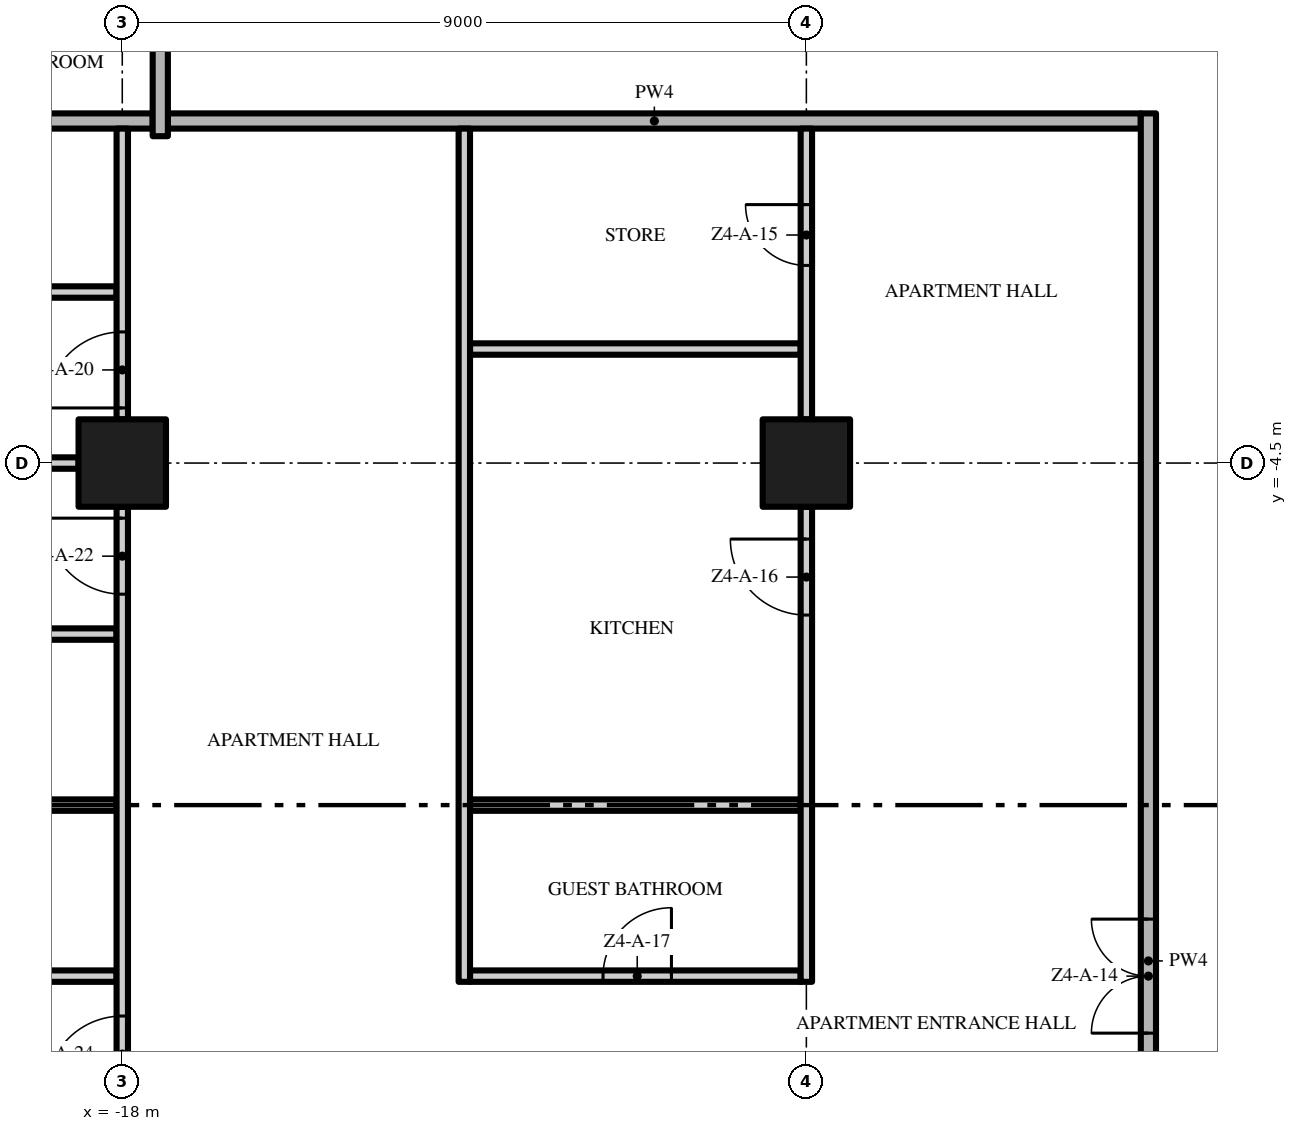
"""IFC4 building model, lengths in metres.
Left out: names, types, materials, properties, quantities, classifications, styles, units other than length and angle.
Written with IfcOpenShell. Run it as: python <this file> out.ifc"""

import sys

from ifc_helpers import new_model, si_unit, direction, frame, frame_2d, origin, origin_2d, place, context, subcontext, project, spatial, rectangle, extrude, element, fill, save


model = new_model("IFC4")
c1 = context("Model", 3, precision=1e-05, world=origin(), true_north=direction((0.0, 1.0)))
c2 = subcontext(c1, "Body", "Model", "MODEL_VIEW")
j1 = project(units=[si_unit("LENGTHUNIT", "METRE"), si_unit("PLANEANGLEUNIT", "RADIAN")], contexts=[c1])
p1 = place(None, origin())
s1 = spatial("IfcSite", under=j1, at=p1, CompositionType="ELEMENT")
p2 = place(p1, origin())
s2 = spatial("IfcBuilding", under=s1, at=p2, CompositionType="ELEMENT")
p3 = place(p2, frame((0.0, 0.0, 192.0)))
s3 = spatial("IfcBuildingStorey", under=s2, at=p3, CompositionType="ELEMENT", Elevation=192.0)
for number, where, z_axis, x_axis in (
    (1, (-18.0, -4.5, 0.0), (0.0, 0.0, 1.0), (1.0, 0.0, 0.0)),
    (2, (-9.0, -4.5, 0.0), (0.0, 0.0, 1.0), (1.0, 0.0, 0.0)),
):
    element("IfcColumn", number, at=place(p3, frame(where, z_axis=z_axis, x_axis=x_axis)), inside=s3, PredefinedType="COLUMN", context=c2, shape_type="SweptSolid", body=[
        extrude(rectangle(XDim=1.15, YDim=1.15, at=origin_2d()), origin(), (0.0, 0.0, 1.0), 3.5),
    ])
p4 = place(p3, frame((-20.925, -11.25, 0.0), z_axis=(0.0, 0.0, 1.0), x_axis=(1.0, 0.0, 0.0)))
e3 = element("IfcWall", 3, at=p4, inside=s3, PredefinedType="PARTITIONING", context=c2, shape_type="SweptSolid", body=[
    extrude(rectangle(XDim=2.85, YDim=0.15, at=frame_2d((1.425, 0.0))), origin(), (0.0, 0.0, 1.0), 3.5),
])
p5 = place(p3, frame((-13.425, -11.25, 0.0), z_axis=(0.0, 0.0, 1.0), x_axis=(1.0, 0.0, 0.0)))
e4 = element("IfcWall", 4, at=p5, inside=s3, PredefinedType="PARTITIONING", context=c2, shape_type="SweptSolid", body=[
    extrude(rectangle(XDim=4.35, YDim=0.15, at=frame_2d((2.175, 0.0))), origin(), (0.0, 0.0, 1.0), 3.5),
])
p6 = place(p5, frame((1.75, 0.0, 0.0)))
e5 = element("IfcOpeningElement", 5, at=p6, cuts=e4, PredefinedType="OPENING", context=c2, shape_type="SweptSolid", body=[
    extrude(rectangle(XDim=0.9, YDim=2.1, at=frame_2d((0.45, 1.05))), frame((0.0, 0.085, 0.0), z_axis=(0.0, -1.0, 0.0), x_axis=(1.0, 0.0, 0.0)), (0.0, 0.0, 1.0), 0.17),
])
p7 = place(p3, frame((-20.925, -9.0, 0.0), z_axis=(0.0, 0.0, 1.0), x_axis=(1.0, 0.0, 0.0)))
e6 = element("IfcWall", 6, at=p7, inside=s3, PredefinedType="PARTITIONING", context=c2, shape_type="SweptSolid", body=[
    extrude(rectangle(XDim=2.85, YDim=0.15, at=frame_2d((1.425, 0.0))), origin(), (0.0, 0.0, 1.0), 3.5),
])
p8 = place(p3, frame((-13.425, -9.0, 0.0), z_axis=(0.0, 0.0, 1.0), x_axis=(1.0, 0.0, 0.0)))
e7 = element("IfcWall", 7, at=p8, inside=s3, PredefinedType="PARTITIONING", context=c2, shape_type="SweptSolid", body=[
    extrude(rectangle(XDim=4.35, YDim=0.15, at=frame_2d((2.175, 0.0))), origin(), (0.0, 0.0, 1.0), 3.5),
])
p9 = place(p3, frame((-20.925, -6.75, 0.0), z_axis=(0.0, 0.0, 1.0), x_axis=(1.0, 0.0, 0.0)))
e8 = element("IfcWall", 8, at=p9, inside=s3, PredefinedType="PARTITIONING", context=c2, shape_type="SweptSolid", body=[
    extrude(rectangle(XDim=2.85, YDim=0.15, at=frame_2d((1.425, 0.0))), origin(), (0.0, 0.0, 1.0), 3.5),
])
p10 = place(p3, frame((-25.95, -4.5, 0.0), z_axis=(0.0, 0.0, 1.0), x_axis=(1.0, 0.0, 0.0)))
e9 = element("IfcWall", 9, at=p10, inside=s3, PredefinedType="PARTITIONING", context=c2, shape_type="SweptSolid", body=[
    extrude(rectangle(XDim=7.375, YDim=0.15, at=frame_2d((3.688, 0.0))), origin(), (0.0, 0.0, 1.0), 3.5),
])
p11 = place(p3, frame((-13.425, -3.0, 0.0), z_axis=(0.0, 0.0, 1.0), x_axis=(1.0, 0.0, 0.0)))
e10 = element("IfcWall", 10, at=p11, inside=s3, PredefinedType="PARTITIONING", context=c2, shape_type="SweptSolid", body=[
    extrude(rectangle(XDim=4.35, YDim=0.15, at=frame_2d((2.175, 0.0))), origin(), (0.0, 0.0, 1.0), 3.5),
])
p12 = place(p3, frame((-20.925, -2.25, 0.0), z_axis=(0.0, 0.0, 1.0), x_axis=(1.0, 0.0, 0.0)))
e11 = element("IfcWall", 11, at=p12, inside=s3, PredefinedType="PARTITIONING", context=c2, shape_type="SweptSolid", body=[
    extrude(rectangle(XDim=2.85, YDim=0.15, at=frame_2d((1.425, 0.0))), origin(), (0.0, 0.0, 1.0), 3.5),
])
p13 = place(p3, frame((-17.4, 0.0, 0.0), z_axis=(0.0, 0.0, 1.0), x_axis=(1.0, 0.0, 0.0)))
e12 = element("IfcWall", 12, at=p13, inside=s3, PredefinedType="PARTITIONING", context=c2, shape_type="SweptSolid", body=[
    extrude(rectangle(XDim=12.8, YDim=0.2, at=frame_2d((6.4, 0.0))), origin(), (0.0, 0.0, 1.0), 3.5),
])
p14 = place(p3, frame((-26.7, 0.0, 0.0), z_axis=(0.0, 0.0, 1.0), x_axis=(1.0, 0.0, 0.0)))
e13 = element("IfcWall", 13, at=p14, inside=s3, PredefinedType="PARTITIONING", context=c2, shape_type="SweptSolid", body=[
    extrude(rectangle(XDim=9.1, YDim=0.2, at=frame_2d((4.55, 0.0))), origin(), (0.0, 0.0, 1.0), 3.5),
])
p15 = place(p3, frame((-18.0, -12.925, 0.0), z_axis=(0.0, 0.0, 1.0), x_axis=(0.0, 1.0, 0.0)))
e14 = element("IfcWall", 14, at=p15, inside=s3, PredefinedType="PARTITIONING", context=c2, shape_type="SweptSolid", body=[
    extrude(rectangle(XDim=7.85, YDim=0.15, at=frame_2d((3.925, 0.0))), origin(), (0.0, 0.0, 1.0), 3.5),
])
p16 = place(p15, frame((6.7, 0.0, 0.0)))
e15 = element("IfcOpeningElement", 15, at=p16, cuts=e14, PredefinedType="OPENING", context=c2, shape_type="SweptSolid", body=[
    extrude(rectangle(XDim=1.0, YDim=2.4, at=frame_2d((0.5, 1.2))), frame((0.0, 0.085, 0.0), z_axis=(0.0, -1.0, 0.0), x_axis=(1.0, 0.0, 0.0)), (0.0, 0.0, 1.0), 0.17),
])
p17 = place(p15, frame((0.15, 0.0, 0.0)))
e16 = element("IfcOpeningElement", 16, at=p17, cuts=e14, PredefinedType="OPENING", context=c2, shape_type="SweptSolid", body=[
    extrude(rectangle(XDim=1.0, YDim=2.4, at=frame_2d((0.5, 1.2))), frame((0.0, 0.085, 0.0), z_axis=(0.0, -1.0, 0.0), x_axis=(1.0, 0.0, 0.0)), (0.0, 0.0, 1.0), 0.17),
])
p18 = place(p3, frame((-18.0, -3.925, 0.0), z_axis=(0.0, 0.0, 1.0), x_axis=(0.0, 1.0, 0.0)))
e17 = element("IfcWall", 17, at=p18, inside=s3, PredefinedType="PARTITIONING", context=c2, shape_type="SweptSolid", body=[
    extrude(rectangle(XDim=3.825, YDim=0.15, at=frame_2d((1.913, 0.0))), origin(), (0.0, 0.0, 1.0), 3.5),
])
p19 = place(p18, frame((0.15, 0.0, 0.0)))
e18 = element("IfcOpeningElement", 18, at=p19, cuts=e17, PredefinedType="OPENING", context=c2, shape_type="SweptSolid", body=[
    extrude(rectangle(XDim=1.0, YDim=2.4, at=frame_2d((0.5, 1.2))), frame((0.0, 0.085, 0.0), z_axis=(0.0, -1.0, 0.0), x_axis=(1.0, 0.0, 0.0)), (0.0, 0.0, 1.0), 0.17),
])
p20 = place(p3, frame((-17.5, -0.2, 0.0), z_axis=(0.0, 0.0, 1.0), x_axis=(0.0, 1.0, 0.0)))
e19 = element("IfcWall", 19, at=p20, inside=s3, PredefinedType="PARTITIONING", context=c2, shape_type="SweptSolid", body=[
    extrude(rectangle(XDim=4.125, YDim=0.2, at=frame_2d((2.062, 0.0))), origin(), (0.0, 0.0, 1.0), 3.5),
])
p21 = place(p3, frame((-13.5, -11.325, 0.0), z_axis=(0.0, 0.0, 1.0), x_axis=(0.0, 1.0, 0.0)))
e20 = element("IfcWall", 20, at=p21, inside=s3, PredefinedType="PARTITIONING", context=c2, shape_type="SweptSolid", body=[
    extrude(rectangle(XDim=11.225, YDim=0.15, at=frame_2d((5.612, 0.0))), origin(), (0.0, 0.0, 1.0), 3.5),
])
p22 = place(p3, frame((-9.0, -11.325, 0.0), z_axis=(0.0, 0.0, 1.0), x_axis=(0.0, 1.0, 0.0)))
e21 = element("IfcWall", 21, at=p22, inside=s3, PredefinedType="PARTITIONING", context=c2, shape_type="SweptSolid", body=[
    extrude(rectangle(XDim=6.25, YDim=0.15, at=frame_2d((3.125, 0.0))), origin(), (0.0, 0.0, 1.0), 3.5),
])
p23 = place(p22, frame((4.825, 0.0, 0.0)))
e22 = element("IfcOpeningElement", 22, at=p23, cuts=e21, PredefinedType="OPENING", context=c2, shape_type="SweptSolid", body=[
    extrude(rectangle(XDim=1.0, YDim=2.4, at=frame_2d((0.5, 1.2))), frame((0.0, 0.085, 0.0), z_axis=(0.0, -1.0, 0.0), x_axis=(1.0, 0.0, 0.0)), (0.0, 0.0, 1.0), 0.17),
])
p24 = place(p3, frame((-9.0, -3.925, 0.0), z_axis=(0.0, 0.0, 1.0), x_axis=(0.0, 1.0, 0.0)))
e23 = element("IfcWall", 23, at=p24, inside=s3, PredefinedType="PARTITIONING", context=c2, shape_type="SweptSolid", body=[
    extrude(rectangle(XDim=3.825, YDim=0.15, at=frame_2d((1.913, 0.0))), origin(), (0.0, 0.0, 1.0), 3.5),
])
p25 = place(p24, frame((2.025, 0.0, 0.0)))
e24 = element("IfcOpeningElement", 24, at=p25, cuts=e23, PredefinedType="OPENING", context=c2, shape_type="SweptSolid", body=[
    extrude(rectangle(XDim=0.8, YDim=2.0, at=frame_2d((0.4, 1.0))), frame((0.0, 0.085, 0.0), z_axis=(0.0, -1.0, 0.0), x_axis=(1.0, 0.0, 0.0)), (0.0, 0.0, 1.0), 0.17),
])
p26 = place(p3, frame((-4.5, -22.2, 0.0), z_axis=(0.0, 0.0, 1.0), x_axis=(0.0, 1.0, 0.0)))
e25 = element("IfcWall", 25, at=p26, inside=s3, PredefinedType="PARTITIONING", context=c2, shape_type="SweptSolid", body=[
    extrude(rectangle(XDim=22.3, YDim=0.2, at=frame_2d((11.15, 0.0))), origin(), (0.0, 0.0, 1.0), 3.5),
])
p27 = place(p26, frame((10.2, 0.0, 0.0)))
e26 = element("IfcOpeningElement", 26, at=p27, cuts=e25, PredefinedType="OPENING", context=c2, shape_type="SweptSolid", body=[
    extrude(rectangle(XDim=1.5, YDim=2.4, at=frame_2d((0.75, 1.2))), frame((0.0, 0.11, 0.0), z_axis=(0.0, -1.0, 0.0), x_axis=(1.0, 0.0, 0.0)), (0.0, 0.0, 1.0), 0.22),
])
p28 = place(p27, origin())
e27 = element("IfcDoor", 27, at=p28, inside=s3, OperationType="DOUBLE_DOOR_SINGLE_SWING", PredefinedType="DOOR", context=c2, shape_type="SweptSolid", body=[
    extrude(rectangle(XDim=1.5, YDim=2.4, at=frame_2d((0.75, 1.2))), frame((0.0, 0.025, 0.0), z_axis=(0.0, -1.0, 0.0), x_axis=(1.0, 0.0, 0.0)), (0.0, 0.0, 1.0), 0.05),
])
fill(e26, e27)
p29 = place(p25, origin())
e28 = element("IfcDoor", 28, at=p29, inside=s3, OperationType="SINGLE_SWING_RIGHT", PredefinedType="DOOR", context=c2, shape_type="SweptSolid", body=[
    extrude(rectangle(XDim=0.8, YDim=2.0, at=frame_2d((0.4, 1.0))), frame((0.0, 0.025, 0.0), z_axis=(0.0, -1.0, 0.0), x_axis=(1.0, 0.0, 0.0)), (0.0, 0.0, 1.0), 0.05),
])
fill(e24, e28)
p30 = place(p23, origin())
e29 = element("IfcDoor", 29, at=p30, inside=s3, OperationType="SINGLE_SWING_RIGHT", PredefinedType="DOOR", context=c2, shape_type="SweptSolid", body=[
    extrude(rectangle(XDim=1.0, YDim=2.4, at=frame_2d((0.5, 1.2))), frame((0.0, 0.025, 0.0), z_axis=(0.0, -1.0, 0.0), x_axis=(1.0, 0.0, 0.0)), (0.0, 0.0, 1.0), 0.05),
])
fill(e22, e29)
p31 = place(p6, origin())
e30 = element("IfcDoor", 30, at=p31, inside=s3, OperationType="SINGLE_SWING_RIGHT", PredefinedType="DOOR", context=c2, shape_type="SweptSolid", body=[
    extrude(rectangle(XDim=0.9, YDim=2.1, at=frame_2d((0.45, 1.05))), frame((0.0, 0.025, 0.0), z_axis=(0.0, -1.0, 0.0), x_axis=(1.0, 0.0, 0.0)), (0.0, 0.0, 1.0), 0.05),
])
fill(e5, e30)
p32 = place(p19, origin())
e31 = element("IfcDoor", 31, at=p32, inside=s3, OperationType="SINGLE_SWING_LEFT", PredefinedType="DOOR", context=c2, shape_type="SweptSolid", body=[
    extrude(rectangle(XDim=1.0, YDim=2.4, at=frame_2d((0.5, 1.2))), frame((0.0, 0.025, 0.0), z_axis=(0.0, -1.0, 0.0), x_axis=(1.0, 0.0, 0.0)), (0.0, 0.0, 1.0), 0.05),
])
fill(e18, e31)
p33 = place(p16, origin())
e32 = element("IfcDoor", 32, at=p33, inside=s3, OperationType="SINGLE_SWING_RIGHT", PredefinedType="DOOR", context=c2, shape_type="SweptSolid", body=[
    extrude(rectangle(XDim=1.0, YDim=2.4, at=frame_2d((0.5, 1.2))), frame((0.0, 0.025, 0.0), z_axis=(0.0, -1.0, 0.0), x_axis=(1.0, 0.0, 0.0)), (0.0, 0.0, 1.0), 0.05),
])
fill(e15, e32)
p34 = place(p17, origin())
e33 = element("IfcDoor", 33, at=p34, inside=s3, OperationType="SINGLE_SWING_LEFT", PredefinedType="DOOR", context=c2, shape_type="SweptSolid", body=[
    extrude(rectangle(XDim=1.0, YDim=2.4, at=frame_2d((0.5, 1.2))), frame((0.0, 0.025, 0.0), z_axis=(0.0, -1.0, 0.0), x_axis=(1.0, 0.0, 0.0)), (0.0, 0.0, 1.0), 0.05),
])
fill(e16, e33)
save(model, sys.argv[1])
